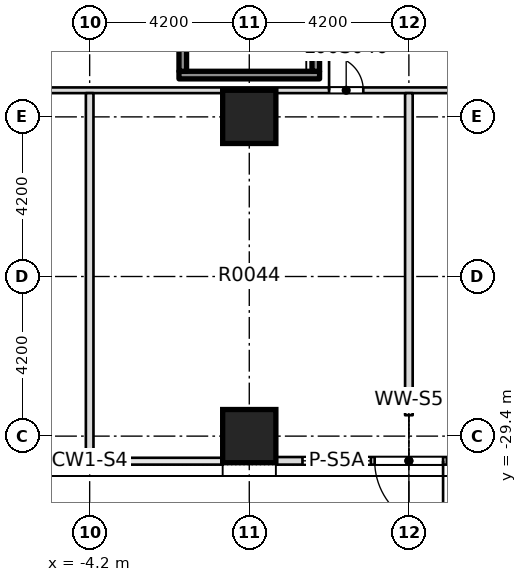
"""IFC4 building model, lengths in metres.
Left out: names, types, materials, properties, quantities, classifications, styles, units other than length and angle.
Written with IfcOpenShell. Run it as: python <this file> out.ifc"""

import sys

from ifc_helpers import new_model, si_unit, direction, frame, frame_2d, origin, origin_2d, place, context, subcontext, project, spatial, rectangle, extrude, element, fill, save


model = new_model("IFC4")
c1 = context("Model", 3, precision=1e-05, world=origin(), true_north=direction((0.0, 1.0)))
c2 = subcontext(c1, "Body", "Model", "MODEL_VIEW")
j1 = project(units=[si_unit("LENGTHUNIT", "METRE"), si_unit("PLANEANGLEUNIT", "RADIAN")], contexts=[c1])
p1 = place(None, origin())
s1 = spatial("IfcSite", under=j1, at=p1, CompositionType="ELEMENT")
p2 = place(p1, origin())
s2 = spatial("IfcBuilding", under=s1, at=p2, CompositionType="ELEMENT")
p3 = place(p2, origin())
s3 = spatial("IfcBuildingStorey", under=s2, at=p3, CompositionType="ELEMENT", Elevation=0.0)
p4 = place(p3, frame((0.0, -21.0, -0.45), z_axis=(0.0, 0.0, 1.0), x_axis=(1.0, 0.0, 0.0)))
e1 = element("IfcColumn", 1, at=p4, inside=s3, PredefinedType="COLUMN", context=c2, shape_type="SweptSolid", body=[
    extrude(rectangle(XDim=1.4, YDim=1.4, at=origin_2d()), origin(), (0.0, 0.0, 1.0), 7.55),
])
p5 = place(p3, frame((0.0, -29.4, 0.0), z_axis=(0.0, 0.0, 1.0), x_axis=(1.0, 0.0, 0.0)))
e2 = element("IfcColumn", 2, at=p5, inside=s3, PredefinedType="COLUMN", context=c2, shape_type="SweptSolid", body=[
    extrude(rectangle(XDim=1.4, YDim=1.4, at=origin_2d()), origin(), (0.0, 0.0, 1.0), 7.5),
])
p6 = place(p3, frame((-34.15, -20.3, 0.0), z_axis=(0.0, 0.0, 1.0), x_axis=(1.0, 0.0, 0.0)))
e3 = element("IfcWall", 3, at=p6, inside=s3, PredefinedType="PARTITIONING", context=c2, shape_type="SweptSolid", body=[
    extrude(rectangle(XDim=67.825, YDim=0.15, at=frame_2d((33.913, 0.0))), origin(), (0.0, 0.0, 1.0), 7.1),
])
p7 = place(p6, frame((12.6, 0.0, 0.0)))
e4 = element("IfcOpeningElement", 4, at=p7, cuts=e3, PredefinedType="OPENING", context=c2, shape_type="SweptSolid", body=[
    extrude(rectangle(XDim=1.1, YDim=2.1, at=frame_2d((0.55, 1.05))), frame((0.0, 0.085, 0.0), z_axis=(0.0, -1.0, 0.0), x_axis=(1.0, 0.0, 0.0)), (0.0, 0.0, 1.0), 0.17),
])
p8 = place(p6, frame((2.825, 0.0, 0.0)))
e5 = element("IfcOpeningElement", 5, at=p8, cuts=e3, PredefinedType="OPENING", context=c2, shape_type="SweptSolid", body=[
    extrude(rectangle(XDim=0.9, YDim=2.1, at=frame_2d((0.45, 1.05))), frame((0.0, 0.085, 0.0), z_axis=(0.0, -1.0, 0.0), x_axis=(1.0, 0.0, 0.0)), (0.0, 0.0, 1.0), 0.17),
])
p9 = place(p6, frame((7.25, 0.0, 0.0)))
e6 = element("IfcOpeningElement", 6, at=p9, cuts=e3, PredefinedType="OPENING", context=c2, shape_type="SweptSolid", body=[
    extrude(rectangle(XDim=0.9, YDim=2.1, at=frame_2d((0.45, 1.05))), frame((0.0, 0.085, 0.0), z_axis=(0.0, -1.0, 0.0), x_axis=(1.0, 0.0, 0.0)), (0.0, 0.0, 1.0), 0.17),
])
p10 = place(p6, frame((20.8, 0.0, 0.0)))
e7 = element("IfcOpeningElement", 7, at=p10, cuts=e3, PredefinedType="OPENING", context=c2, shape_type="SweptSolid", body=[
    extrude(rectangle(XDim=0.9, YDim=2.1, at=frame_2d((0.45, 1.05))), frame((0.0, 0.085, 0.0), z_axis=(0.0, -1.0, 0.0), x_axis=(1.0, 0.0, 0.0)), (0.0, 0.0, 1.0), 0.17),
])
p11 = place(p6, frame((27.4, 0.0, 0.0)))
e8 = element("IfcOpeningElement", 8, at=p11, cuts=e3, PredefinedType="OPENING", context=c2, shape_type="SweptSolid", body=[
    extrude(rectangle(XDim=0.9, YDim=2.1, at=frame_2d((0.45, 1.05))), frame((0.0, 0.085, 0.0), z_axis=(0.0, -1.0, 0.0), x_axis=(1.0, 0.0, 0.0)), (0.0, 0.0, 1.0), 0.17),
])
p12 = place(p6, frame((36.25, 0.0, 0.0)))
e9 = element("IfcOpeningElement", 9, at=p12, cuts=e3, PredefinedType="OPENING", context=c2, shape_type="SweptSolid", body=[
    extrude(rectangle(XDim=0.9, YDim=2.1, at=frame_2d((0.45, 1.05))), frame((0.0, 0.085, 0.0), z_axis=(0.0, -1.0, 0.0), x_axis=(1.0, 0.0, 0.0)), (0.0, 0.0, 1.0), 0.17),
])
p13 = place(p6, frame((46.65, 0.0, 0.0)))
e10 = element("IfcOpeningElement", 10, at=p13, cuts=e3, PredefinedType="OPENING", context=c2, shape_type="SweptSolid", body=[
    extrude(rectangle(XDim=0.9, YDim=2.1, at=frame_2d((0.45, 1.05))), frame((0.0, 0.085, 0.0), z_axis=(0.0, -1.0, 0.0), x_axis=(1.0, 0.0, 0.0)), (0.0, 0.0, 1.0), 0.17),
])
p14 = place(p6, frame((54.6, 0.0, 0.0)))
e11 = element("IfcOpeningElement", 11, at=p14, cuts=e3, PredefinedType="OPENING", context=c2, shape_type="SweptSolid", body=[
    extrude(rectangle(XDim=1.1, YDim=2.1, at=frame_2d((0.55, 1.05))), frame((0.0, 0.085, 0.0), z_axis=(0.0, -1.0, 0.0), x_axis=(1.0, 0.0, 0.0)), (0.0, 0.0, 1.0), 0.17),
])
p15 = place(p6, frame((63.1, 0.0, 0.0)))
e12 = element("IfcOpeningElement", 12, at=p15, cuts=e3, PredefinedType="OPENING", context=c2, shape_type="SweptSolid", body=[
    extrude(rectangle(XDim=0.9, YDim=2.1, at=frame_2d((0.45, 1.05))), frame((0.0, 0.085, 0.0), z_axis=(0.0, -1.0, 0.0), x_axis=(1.0, 0.0, 0.0)), (0.0, 0.0, 1.0), 0.17),
])
p16 = place(p3, frame((-4.2, -29.95, 0.0), z_axis=(0.0, 0.0, 1.0), x_axis=(0.0, 1.0, 0.0)))
e13 = element("IfcWall", 13, at=p16, inside=s3, PredefinedType="PARTITIONING", context=c2, shape_type="SweptSolid", body=[
    extrude(rectangle(XDim=9.575, YDim=0.2, at=frame_2d((4.788, 0.0))), origin(), (0.0, 0.0, 1.0), 7.1),
])
p17 = place(p3, frame((4.2, -28.85, 0.0), z_axis=(0.0, 0.0, 1.0), x_axis=(0.0, 1.0, 0.0)))
e14 = element("IfcWall", 14, at=p17, inside=s3, PredefinedType="PARTITIONING", context=c2, shape_type="SweptSolid", body=[
    extrude(rectangle(XDim=8.475, YDim=0.2, at=frame_2d((4.238, 0.0))), origin(), (0.0, 0.0, 1.0), 7.1),
])
p18 = place(p3, frame((7.7, -30.05, 0.0), z_axis=(0.0, 0.0, 1.0), x_axis=(-1.0, 0.0, 0.0)))
e15 = element("IfcWall", 15, at=p18, inside=s3, PredefinedType="STANDARD", context=c2, shape_type="SweptSolid", body=[
    extrude(rectangle(XDim=7.0, YDim=0.2, at=frame_2d((3.5, 0.0))), origin(), (0.0, 0.0, 1.0), 7.1),
])
p19 = place(p18, frame((4.5, 0.0, 0.3)))
e16 = element("IfcOpeningElement", 16, at=p19, cuts=e15, PredefinedType="OPENING", context=c2, shape_type="SweptSolid", body=[
    extrude(rectangle(XDim=1.8, YDim=4.2, at=frame_2d((0.9, 2.1))), frame((0.0, 0.11, 0.0), z_axis=(0.0, -1.0, 0.0), x_axis=(1.0, 0.0, 0.0)), (0.0, 0.0, 1.0), 0.22),
])
p20 = place(p18, frame((2.6, 0.0, 0.0)))
e17 = element("IfcOpeningElement", 17, at=p20, cuts=e15, PredefinedType="OPENING", context=c2, shape_type="SweptSolid", body=[
    extrude(rectangle(XDim=1.8, YDim=2.4, at=frame_2d((0.9, 1.2))), frame((0.0, 0.11, 0.0), z_axis=(0.0, -1.0, 0.0), x_axis=(1.0, 0.0, 0.0)), (0.0, 0.0, 1.0), 0.22),
])
p21 = place(p18, frame((0.7, 0.0, 0.3)))
e18 = element("IfcOpeningElement", 18, at=p21, cuts=e15, PredefinedType="OPENING", context=c2, shape_type="SweptSolid", body=[
    extrude(rectangle(XDim=1.8, YDim=4.2, at=frame_2d((0.9, 2.1))), frame((0.0, 0.11, 0.0), z_axis=(0.0, -1.0, 0.0), x_axis=(1.0, 0.0, 0.0)), (0.0, 0.0, 1.0), 0.22),
])
p22 = place(p3, frame((-1.85, -19.9, 0.0), z_axis=(0.0, 0.0, 1.0), x_axis=(1.0, 0.0, 0.0)))
e19 = element("IfcWall", 19, at=p22, inside=s3, PredefinedType="SOLIDWALL", context=c2, shape_type="SweptSolid", body=[
    extrude(rectangle(XDim=3.7, YDim=0.2, at=frame_2d((1.85, 0.0))), origin(), (0.0, 0.0, 1.0), 7.1),
])
for number, where, z_axis, x_axis in (
    (20, (-1.75, -19.8, 0.0), (0.0, 0.0, 1.0), (0.0, 1.0, 0.0)),
    (21, (1.75, -19.8, 0.0), (0.0, 0.0, 1.0), (0.0, 1.0, 0.0)),
):
    element("IfcWall", number, at=place(p3, frame(where, z_axis=z_axis, x_axis=x_axis)), inside=s3, PredefinedType="SOLIDWALL", context=c2, shape_type="SweptSolid", body=[
        extrude(rectangle(XDim=6.6, YDim=0.2, at=frame_2d((3.3, 0.0))), origin(), (0.0, 0.0, 1.0), 7.1),
    ])
p23 = place(p12, origin())
e22 = element("IfcDoor", 22, at=p23, inside=s3, OperationType="SINGLE_SWING_RIGHT", PredefinedType="DOOR", context=c2, shape_type="SweptSolid", body=[
    extrude(rectangle(XDim=0.9, YDim=2.1, at=frame_2d((0.45, 1.05))), frame((0.0, 0.025, 0.0), z_axis=(0.0, -1.0, 0.0), x_axis=(1.0, 0.0, 0.0)), (0.0, 0.0, 1.0), 0.05),
])
fill(e9, e22)
p24 = place(p19, origin())
e23 = element("IfcWindow", 23, at=p24, inside=s3, PartitioningType="SINGLE_PANEL", PredefinedType="WINDOW", context=c2, shape_type="SweptSolid", body=[
    extrude(rectangle(XDim=1.8, YDim=4.2, at=frame_2d((0.9, 2.1))), frame((0.0, 0.03, 0.0), z_axis=(0.0, -1.0, 0.0), x_axis=(1.0, 0.0, 0.0)), (0.0, 0.0, 1.0), 0.06),
])
fill(e16, e23)
p25 = place(p20, origin())
e24 = element("IfcDoor", 24, at=p25, inside=s3, OperationType="SINGLE_SWING_LEFT", PredefinedType="DOOR", context=c2, shape_type="SweptSolid", body=[
    extrude(rectangle(XDim=1.8, YDim=2.4, at=frame_2d((0.9, 1.2))), frame((0.0, 0.025, 0.0), z_axis=(0.0, -1.0, 0.0), x_axis=(1.0, 0.0, 0.0)), (0.0, 0.0, 1.0), 0.05),
])
fill(e17, e24)
save(model, sys.argv[1])
